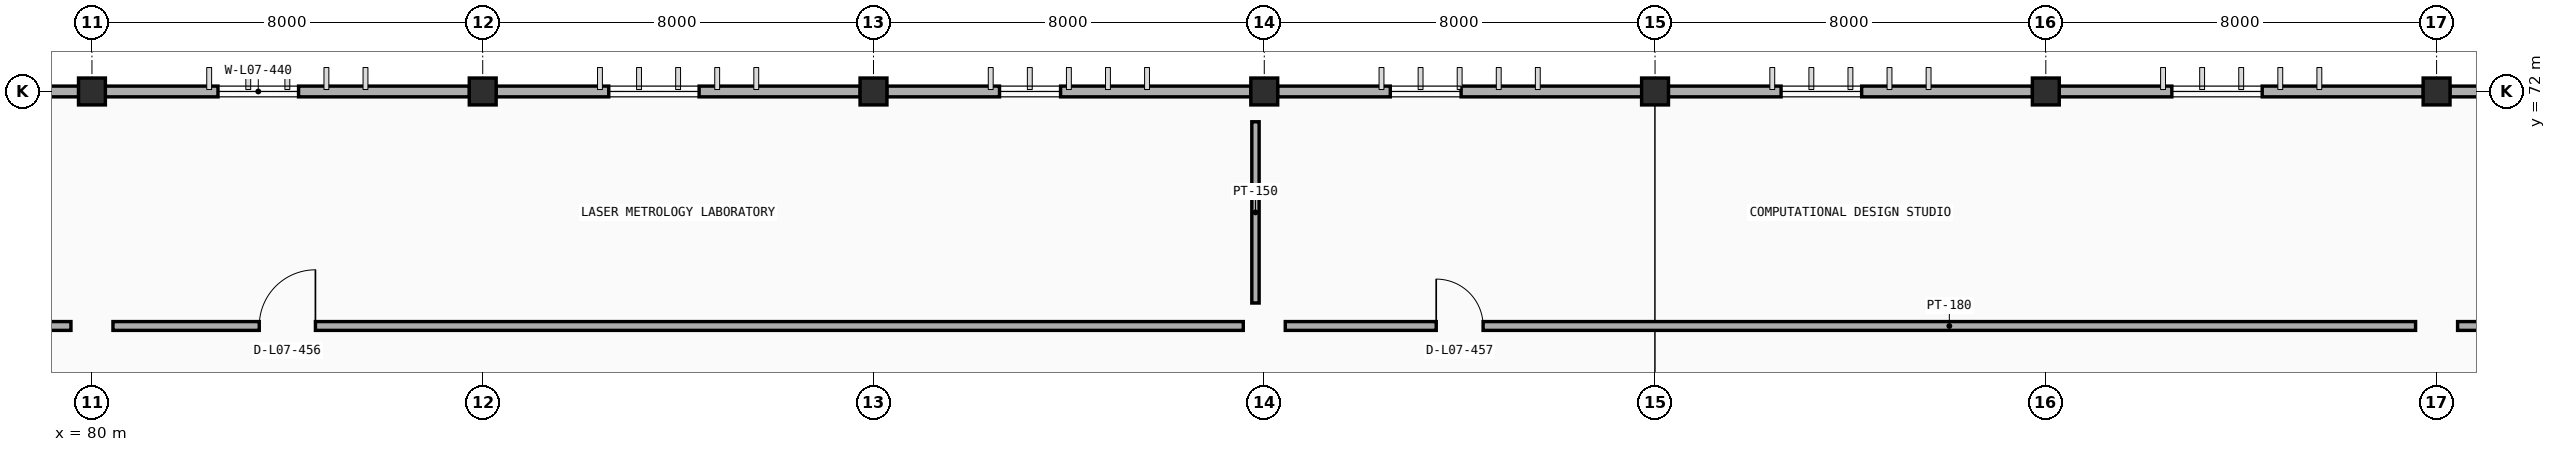
"""IFC4 building model, lengths in metres.
Left out: names, types, materials, properties, quantities, classifications, styles, units other than length and angle.
Written with IfcOpenShell. Run it as: python <this file> out.ifc"""

import sys

from ifc_helpers import new_model, si_unit, direction, frame, frame_2d, origin, origin_2d, place, context, subcontext, project, spatial, rectangle, extrude, element, fill, save


model = new_model("IFC4")
c1 = context("Model", 3, precision=1e-05, world=origin(), true_north=direction((0.0, 1.0)))
c2 = subcontext(c1, "Body", "Model", "MODEL_VIEW")
j1 = project(units=[si_unit("LENGTHUNIT", "METRE"), si_unit("PLANEANGLEUNIT", "RADIAN")], contexts=[c1])
p1 = place(None, origin())
s1 = spatial("IfcSite", under=j1, at=p1, CompositionType="ELEMENT")
p2 = place(p1, origin())
s2 = spatial("IfcBuilding", under=s1, at=p2, CompositionType="ELEMENT")
p3 = place(p2, frame((0.0, 0.0, 26.4)))
s3 = spatial("IfcBuildingStorey", under=s2, at=p3, CompositionType="ELEMENT", Elevation=26.4)
for number, where, z_axis, x_axis in (
    (1, (80.0, 72.0, 0.0), (0.0, 0.0, 1.0), (1.0, 0.0, 0.0)),
    (2, (88.0, 72.0, 0.0), (0.0, 0.0, 1.0), (1.0, 0.0, 0.0)),
    (3, (96.0, 72.0, 0.0), (0.0, 0.0, 1.0), (1.0, 0.0, 0.0)),
    (4, (104.0, 72.0, 0.0), (0.0, 0.0, 1.0), (1.0, 0.0, 0.0)),
    (5, (112.0, 72.0, 0.0), (0.0, 0.0, 1.0), (1.0, 0.0, 0.0)),
    (6, (120.0, 72.0, 0.0), (0.0, 0.0, 1.0), (1.0, 0.0, 0.0)),
    (7, (128.0, 72.0, 0.0), (0.0, 0.0, 1.0), (1.0, 0.0, 0.0)),
):
    element("IfcColumn", number, at=place(p3, frame(where, z_axis=z_axis, x_axis=x_axis)), inside=s3, PredefinedType="COLUMN", context=c2, shape_type="SweptSolid", body=[
        extrude(rectangle(XDim=0.55, YDim=0.55, at=origin_2d()), origin(), (0.0, 0.0, 1.0), 4.2),
    ])
p4 = place(p3, frame((72.272, 72.0, 0.0), z_axis=(0.0, 0.0, 1.0), x_axis=(1.0, 0.0, 0.0)))
e8 = element("IfcWall", 8, at=p4, inside=s3, PredefinedType="STANDARD", context=c2, shape_type="SweptSolid", body=[
    extrude(rectangle(XDim=7.456, YDim=0.22, at=frame_2d((3.728, 0.0))), origin(), (0.0, 0.0, 1.0), 3.35),
])
p5 = place(p4, frame((2.308, 0.0, 0.9)))
e9 = element("IfcOpeningElement", 9, at=p5, cuts=e8, PredefinedType="OPENING", context=c2, shape_type="SweptSolid", body=[
    extrude(rectangle(XDim=1.45, YDim=1.25, at=frame_2d((0.725, 0.625))), frame((0.0, 0.12, 0.0), z_axis=(0.0, -1.0, 0.0), x_axis=(1.0, 0.0, 0.0)), (0.0, 0.0, 1.0), 0.24),
])
p6 = place(p3, frame((80.272, 72.0, 0.0), z_axis=(0.0, 0.0, 1.0), x_axis=(1.0, 0.0, 0.0)))
e10 = element("IfcWall", 10, at=p6, inside=s3, PredefinedType="STANDARD", context=c2, shape_type="SweptSolid", body=[
    extrude(rectangle(XDim=7.456, YDim=0.22, at=frame_2d((3.728, 0.0))), origin(), (0.0, 0.0, 1.0), 3.35),
])
p7 = place(p6, frame((2.308, 0.0, 0.9)))
e11 = element("IfcOpeningElement", 11, at=p7, cuts=e10, PredefinedType="OPENING", context=c2, shape_type="SweptSolid", body=[
    extrude(rectangle(XDim=1.65, YDim=1.25, at=frame_2d((0.825, 0.625))), frame((0.0, 0.12, 0.0), z_axis=(0.0, -1.0, 0.0), x_axis=(1.0, 0.0, 0.0)), (0.0, 0.0, 1.0), 0.24),
])
p8 = place(p3, frame((88.272, 72.0, 0.0), z_axis=(0.0, 0.0, 1.0), x_axis=(1.0, 0.0, 0.0)))
e12 = element("IfcWall", 12, at=p8, inside=s3, PredefinedType="STANDARD", context=c2, shape_type="SweptSolid", body=[
    extrude(rectangle(XDim=7.456, YDim=0.22, at=frame_2d((3.728, 0.0))), origin(), (0.0, 0.0, 1.0), 3.35),
])
p9 = place(p8, frame((2.308, 0.0, 0.9)))
e13 = element("IfcOpeningElement", 13, at=p9, cuts=e12, PredefinedType="OPENING", context=c2, shape_type="SweptSolid", body=[
    extrude(rectangle(XDim=1.85, YDim=1.25, at=frame_2d((0.925, 0.625))), frame((0.0, 0.12, 0.0), z_axis=(0.0, -1.0, 0.0), x_axis=(1.0, 0.0, 0.0)), (0.0, 0.0, 1.0), 0.24),
])
p10 = place(p3, frame((96.272, 72.0, 0.0), z_axis=(0.0, 0.0, 1.0), x_axis=(1.0, 0.0, 0.0)))
e14 = element("IfcWall", 14, at=p10, inside=s3, PredefinedType="STANDARD", context=c2, shape_type="SweptSolid", body=[
    extrude(rectangle(XDim=7.456, YDim=0.22, at=frame_2d((3.728, 0.0))), origin(), (0.0, 0.0, 1.0), 3.35),
])
p11 = place(p10, frame((2.308, 0.0, 0.9)))
e15 = element("IfcOpeningElement", 15, at=p11, cuts=e14, PredefinedType="OPENING", context=c2, shape_type="SweptSolid", body=[
    extrude(rectangle(XDim=1.25, YDim=1.25, at=frame_2d((0.625, 0.625))), frame((0.0, 0.12, 0.0), z_axis=(0.0, -1.0, 0.0), x_axis=(1.0, 0.0, 0.0)), (0.0, 0.0, 1.0), 0.24),
])
p12 = place(p3, frame((104.272, 72.0, 0.0), z_axis=(0.0, 0.0, 1.0), x_axis=(1.0, 0.0, 0.0)))
e16 = element("IfcWall", 16, at=p12, inside=s3, PredefinedType="STANDARD", context=c2, shape_type="SweptSolid", body=[
    extrude(rectangle(XDim=7.456, YDim=0.22, at=frame_2d((3.728, 0.0))), origin(), (0.0, 0.0, 1.0), 3.35),
])
p13 = place(p12, frame((2.308, 0.0, 0.9)))
e17 = element("IfcOpeningElement", 17, at=p13, cuts=e16, PredefinedType="OPENING", context=c2, shape_type="SweptSolid", body=[
    extrude(rectangle(XDim=1.45, YDim=1.25, at=frame_2d((0.725, 0.625))), frame((0.0, 0.12, 0.0), z_axis=(0.0, -1.0, 0.0), x_axis=(1.0, 0.0, 0.0)), (0.0, 0.0, 1.0), 0.24),
])
p14 = place(p3, frame((112.272, 72.0, 0.0), z_axis=(0.0, 0.0, 1.0), x_axis=(1.0, 0.0, 0.0)))
e18 = element("IfcWall", 18, at=p14, inside=s3, PredefinedType="STANDARD", context=c2, shape_type="SweptSolid", body=[
    extrude(rectangle(XDim=7.456, YDim=0.22, at=frame_2d((3.728, 0.0))), origin(), (0.0, 0.0, 1.0), 3.35),
])
p15 = place(p14, frame((2.308, 0.0, 0.9)))
e19 = element("IfcOpeningElement", 19, at=p15, cuts=e18, PredefinedType="OPENING", context=c2, shape_type="SweptSolid", body=[
    extrude(rectangle(XDim=1.65, YDim=1.25, at=frame_2d((0.825, 0.625))), frame((0.0, 0.12, 0.0), z_axis=(0.0, -1.0, 0.0), x_axis=(1.0, 0.0, 0.0)), (0.0, 0.0, 1.0), 0.24),
])
p16 = place(p3, frame((120.272, 72.0, 0.0), z_axis=(0.0, 0.0, 1.0), x_axis=(1.0, 0.0, 0.0)))
e20 = element("IfcWall", 20, at=p16, inside=s3, PredefinedType="STANDARD", context=c2, shape_type="SweptSolid", body=[
    extrude(rectangle(XDim=7.456, YDim=0.22, at=frame_2d((3.728, 0.0))), origin(), (0.0, 0.0, 1.0), 3.35),
])
p17 = place(p16, frame((2.308, 0.0, 0.9)))
e21 = element("IfcOpeningElement", 21, at=p17, cuts=e20, PredefinedType="OPENING", context=c2, shape_type="SweptSolid", body=[
    extrude(rectangle(XDim=1.85, YDim=1.25, at=frame_2d((0.925, 0.625))), frame((0.0, 0.12, 0.0), z_axis=(0.0, -1.0, 0.0), x_axis=(1.0, 0.0, 0.0)), (0.0, 0.0, 1.0), 0.24),
])
p18 = place(p3, frame((128.272, 72.0, 0.0), z_axis=(0.0, 0.0, 1.0), x_axis=(1.0, 0.0, 0.0)))
e22 = element("IfcWall", 22, at=p18, inside=s3, PredefinedType="STANDARD", context=c2, shape_type="SweptSolid", body=[
    extrude(rectangle(XDim=7.456, YDim=0.22, at=frame_2d((3.728, 0.0))), origin(), (0.0, 0.0, 1.0), 3.35),
])
p19 = place(p18, frame((2.308, 0.0, 0.9)))
e23 = element("IfcOpeningElement", 23, at=p19, cuts=e22, PredefinedType="OPENING", context=c2, shape_type="SweptSolid", body=[
    extrude(rectangle(XDim=1.25, YDim=1.25, at=frame_2d((0.625, 0.625))), frame((0.0, 0.12, 0.0), z_axis=(0.0, -1.0, 0.0), x_axis=(1.0, 0.0, 0.0)), (0.0, 0.0, 1.0), 0.24),
])
p20 = place(p3, frame((64.43, 67.2, 0.0), z_axis=(0.0, 0.0, 1.0), x_axis=(1.0, 0.0, 0.0)))
e24 = element("IfcWall", 24, at=p20, inside=s3, PredefinedType="PARTITIONING", context=c2, shape_type="SweptSolid", body=[
    extrude(rectangle(XDim=15.14, YDim=0.18, at=frame_2d((7.57, 0.0))), origin(), (0.0, 0.0, 1.0), 3.3),
])
p21 = place(p20, frame((3.06, 0.0, 0.0)))
e25 = element("IfcOpeningElement", 25, at=p21, cuts=e24, PredefinedType="OPENING", context=c2, shape_type="SweptSolid", body=[
    extrude(rectangle(XDim=1.02, YDim=2.1, at=frame_2d((0.51, 1.05))), frame((0.0, 0.1, 0.0), z_axis=(0.0, -1.0, 0.0), x_axis=(1.0, 0.0, 0.0)), (0.0, 0.0, 1.0), 0.2),
])
p22 = place(p3, frame((80.43, 67.2, 0.0), z_axis=(0.0, 0.0, 1.0), x_axis=(1.0, 0.0, 0.0)))
e26 = element("IfcWall", 26, at=p22, inside=s3, PredefinedType="PARTITIONING", context=c2, shape_type="SweptSolid", body=[
    extrude(rectangle(XDim=23.14, YDim=0.18, at=frame_2d((11.57, 0.0))), origin(), (0.0, 0.0, 1.0), 3.3),
])
p23 = place(p22, frame((2.995, 0.0, 0.0)))
e27 = element("IfcOpeningElement", 27, at=p23, cuts=e26, PredefinedType="OPENING", context=c2, shape_type="SweptSolid", body=[
    extrude(rectangle(XDim=1.15, YDim=2.15, at=frame_2d((0.575, 1.075))), frame((0.0, 0.1, 0.0), z_axis=(0.0, -1.0, 0.0), x_axis=(1.0, 0.0, 0.0)), (0.0, 0.0, 1.0), 0.2),
])
p24 = place(p3, frame((103.82, 67.67, 0.0), z_axis=(0.0, 0.0, 1.0), x_axis=(0.0, 1.0, 0.0)))
e28 = element("IfcWall", 28, at=p24, inside=s3, PredefinedType="PARTITIONING", context=c2, shape_type="SweptSolid", body=[
    extrude(rectangle(XDim=3.71, YDim=0.15, at=frame_2d((1.855, 0.0))), origin(), (0.0, 0.0, 1.0), 3.3),
])
p25 = place(p3, frame((104.43, 67.2, 0.0), z_axis=(0.0, 0.0, 1.0), x_axis=(1.0, 0.0, 0.0)))
e29 = element("IfcWall", 29, at=p25, inside=s3, PredefinedType="PARTITIONING", context=c2, shape_type="SweptSolid", body=[
    extrude(rectangle(XDim=23.14, YDim=0.18, at=frame_2d((11.57, 0.0))), origin(), (0.0, 0.0, 1.0), 3.3),
])
p26 = place(p25, frame((3.09, 0.0, 0.0)))
e30 = element("IfcOpeningElement", 30, at=p26, cuts=e29, PredefinedType="OPENING", context=c2, shape_type="SweptSolid", body=[
    extrude(rectangle(XDim=0.96, YDim=2.15, at=frame_2d((0.48, 1.075))), frame((0.0, 0.1, 0.0), z_axis=(0.0, -1.0, 0.0), x_axis=(1.0, 0.0, 0.0)), (0.0, 0.0, 1.0), 0.2),
])
p27 = place(p3, frame((128.43, 67.2, 0.0), z_axis=(0.0, 0.0, 1.0), x_axis=(1.0, 0.0, 0.0)))
e31 = element("IfcWall", 31, at=p27, inside=s3, PredefinedType="PARTITIONING", context=c2, shape_type="SweptSolid", body=[
    extrude(rectangle(XDim=23.14, YDim=0.18, at=frame_2d((11.57, 0.0))), origin(), (0.0, 0.0, 1.0), 3.3),
])
p28 = place(p27, frame((2.85, 0.0, 0.0)))
e32 = element("IfcOpeningElement", 32, at=p28, cuts=e31, PredefinedType="OPENING", context=c2, shape_type="SweptSolid", body=[
    extrude(rectangle(XDim=1.44, YDim=2.2, at=frame_2d((0.72, 1.1))), frame((0.0, 0.1, 0.0), z_axis=(0.0, -1.0, 0.0), x_axis=(1.0, 0.0, 0.0)), (0.0, 0.0, 1.0), 0.2),
])
p29 = place(p7, origin())
e33 = element("IfcWindow", 33, at=p29, inside=s3, PartitioningType="DOUBLE_PANEL_VERTICAL", PredefinedType="WINDOW", context=c2, shape_type="SweptSolid", body=[
    extrude(rectangle(XDim=1.65, YDim=1.25, at=frame_2d((0.825, 0.625))), frame((0.0, 0.03, 0.0), z_axis=(0.0, -1.0, 0.0), x_axis=(1.0, 0.0, 0.0)), (0.0, 0.0, 1.0), 0.06),
])
fill(e11, e33)
p30 = place(p9, origin())
e34 = element("IfcWindow", 34, at=p30, inside=s3, PartitioningType="DOUBLE_PANEL_VERTICAL", PredefinedType="WINDOW", context=c2, shape_type="SweptSolid", body=[
    extrude(rectangle(XDim=1.85, YDim=1.25, at=frame_2d((0.925, 0.625))), frame((0.0, 0.03, 0.0), z_axis=(0.0, -1.0, 0.0), x_axis=(1.0, 0.0, 0.0)), (0.0, 0.0, 1.0), 0.06),
])
fill(e13, e34)
p31 = place(p11, origin())
e35 = element("IfcWindow", 35, at=p31, inside=s3, PartitioningType="SINGLE_PANEL", PredefinedType="WINDOW", context=c2, shape_type="SweptSolid", body=[
    extrude(rectangle(XDim=1.25, YDim=1.25, at=frame_2d((0.625, 0.625))), frame((0.0, 0.03, 0.0), z_axis=(0.0, -1.0, 0.0), x_axis=(1.0, 0.0, 0.0)), (0.0, 0.0, 1.0), 0.06),
])
fill(e15, e35)
p32 = place(p13, origin())
e36 = element("IfcWindow", 36, at=p32, inside=s3, PartitioningType="SINGLE_PANEL", PredefinedType="WINDOW", context=c2, shape_type="SweptSolid", body=[
    extrude(rectangle(XDim=1.45, YDim=1.25, at=frame_2d((0.725, 0.625))), frame((0.0, 0.03, 0.0), z_axis=(0.0, -1.0, 0.0), x_axis=(1.0, 0.0, 0.0)), (0.0, 0.0, 1.0), 0.06),
])
fill(e17, e36)
p33 = place(p15, origin())
e37 = element("IfcWindow", 37, at=p33, inside=s3, PartitioningType="DOUBLE_PANEL_VERTICAL", PredefinedType="WINDOW", context=c2, shape_type="SweptSolid", body=[
    extrude(rectangle(XDim=1.65, YDim=1.25, at=frame_2d((0.825, 0.625))), frame((0.0, 0.03, 0.0), z_axis=(0.0, -1.0, 0.0), x_axis=(1.0, 0.0, 0.0)), (0.0, 0.0, 1.0), 0.06),
])
fill(e19, e37)
p34 = place(p17, origin())
e38 = element("IfcWindow", 38, at=p34, inside=s3, PartitioningType="DOUBLE_PANEL_VERTICAL", PredefinedType="WINDOW", context=c2, shape_type="SweptSolid", body=[
    extrude(rectangle(XDim=1.85, YDim=1.25, at=frame_2d((0.925, 0.625))), frame((0.0, 0.03, 0.0), z_axis=(0.0, -1.0, 0.0), x_axis=(1.0, 0.0, 0.0)), (0.0, 0.0, 1.0), 0.06),
])
fill(e21, e38)
p35 = place(p23, origin())
e39 = element("IfcDoor", 39, at=p35, inside=s3, OperationType="SINGLE_SWING_RIGHT", PredefinedType="DOOR", context=c2, shape_type="SweptSolid", body=[
    extrude(rectangle(XDim=1.15, YDim=2.15, at=frame_2d((0.575, 1.075))), frame((0.0, 0.025, 0.0), z_axis=(0.0, -1.0, 0.0), x_axis=(1.0, 0.0, 0.0)), (0.0, 0.0, 1.0), 0.05),
])
fill(e27, e39)
p36 = place(p26, origin())
e40 = element("IfcDoor", 40, at=p36, inside=s3, OperationType="SINGLE_SWING_LEFT", PredefinedType="DOOR", context=c2, shape_type="SweptSolid", body=[
    extrude(rectangle(XDim=0.96, YDim=2.15, at=frame_2d((0.48, 1.075))), frame((0.0, 0.025, 0.0), z_axis=(0.0, -1.0, 0.0), x_axis=(1.0, 0.0, 0.0)), (0.0, 0.0, 1.0), 0.05),
])
fill(e30, e40)
save(model, sys.argv[1])
